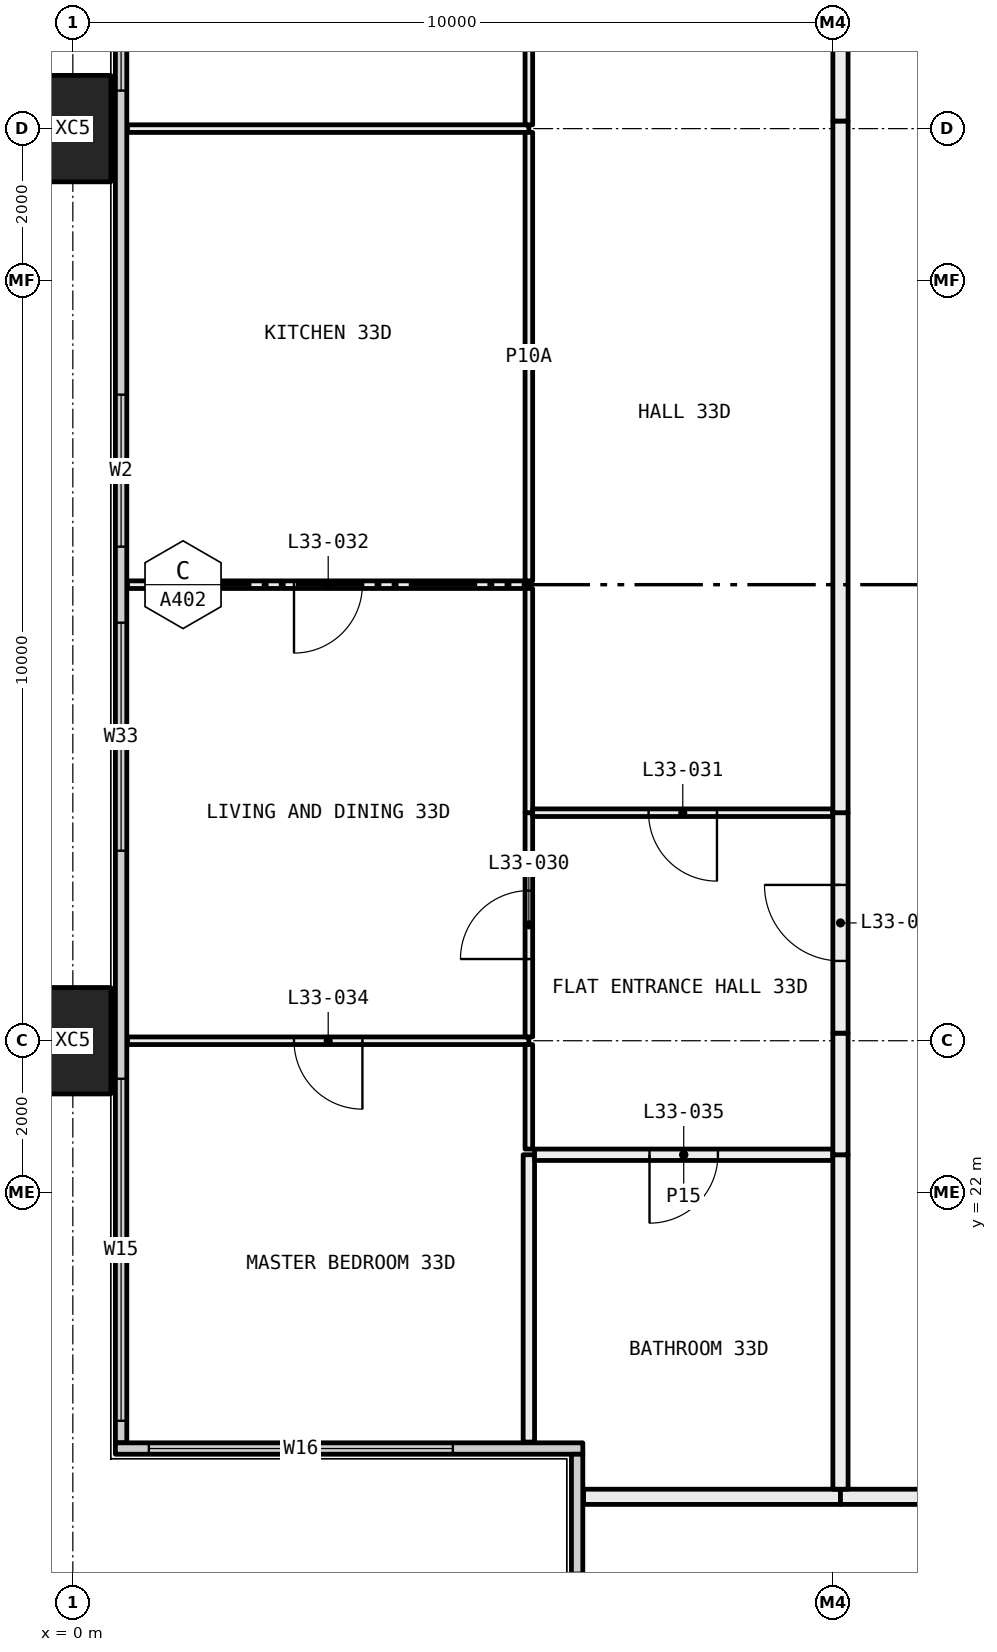
"""IFC4 building model, lengths in metres.
Left out: names, types, materials, properties, quantities, classifications, styles, units other than length and angle.
Written with IfcOpenShell. Run it as: python <this file> out.ifc"""

import sys

from ifc_helpers import new_model, si_unit, direction, frame, frame_2d, origin, origin_2d, place, context, subcontext, project, spatial, rectangle, hollow_rectangle, extrude, element, fill, save


model = new_model("IFC4")
c1 = context("Model", 3, precision=1e-05, world=origin(), true_north=direction((0.0, 1.0)))
c2 = subcontext(c1, "Body", "Model", "MODEL_VIEW")
j1 = project(units=[si_unit("LENGTHUNIT", "METRE"), si_unit("PLANEANGLEUNIT", "RADIAN")], contexts=[c1])
p1 = place(None, origin())
s1 = spatial("IfcSite", under=j1, at=p1, CompositionType="ELEMENT")
p2 = place(p1, origin())
s2 = spatial("IfcBuilding", under=s1, at=p2, CompositionType="ELEMENT")
p3 = place(p2, frame((0.0, 0.0, 127.65)))
s3 = spatial("IfcBuildingStorey", under=s2, at=p3, CompositionType="ELEMENT", Elevation=127.65)
for number, where, z_axis, x_axis in (
    (1, (0.0, 24.0, -0.4), (0.0, 0.0, 1.0), (0.0, 1.0, 0.0)),
    (2, (0.0, 36.0, -0.4), (0.0, 0.0, 1.0), (0.0, 1.0, 0.0)),
):
    element("IfcColumn", number, at=place(p3, frame(where, z_axis=z_axis, x_axis=x_axis)), inside=s3, PredefinedType="COLUMN", context=c2, shape_type="SweptSolid", body=[
        extrude(hollow_rectangle(XDim=1.4, YDim=1.0, WallThickness=0.055, at=origin_2d()), origin(), (0.0, 0.0, 1.0), 3.45),
    ])
p4 = place(p3, frame((0.635, 18.71, 0.0), z_axis=(0.0, 0.0, 1.0), x_axis=(0.0, 1.0, 0.0)))
e3 = element("IfcWall", 3, at=p4, inside=s3, PredefinedType="ELEMENTEDWALL", context=c2, shape_type="SweptSolid", body=[
    extrude(rectangle(XDim=22.58, YDim=0.15, at=frame_2d((11.29, 0.0))), origin(), (0.0, 0.0, 1.0), 3.05),
])
p5 = place(p4, frame((0.29, 0.0, 0.45)))
e4 = element("IfcOpeningElement", 4, at=p5, cuts=e3, PredefinedType="OPENING", context=c2, shape_type="SweptSolid", body=[
    extrude(rectangle(XDim=4.5, YDim=2.55, at=frame_2d((2.25, 1.275))), frame((0.0, 0.085, 0.0), z_axis=(0.0, -1.0, 0.0), x_axis=(1.0, 0.0, 0.0)), (0.0, 0.0, 1.0), 0.17),
])
p6 = place(p4, frame((7.79, 0.0, 0.45)))
e5 = element("IfcOpeningElement", 5, at=p6, cuts=e3, PredefinedType="OPENING", context=c2, shape_type="SweptSolid", body=[
    extrude(rectangle(XDim=3.0, YDim=2.55, at=frame_2d((1.5, 1.275))), frame((0.0, 0.085, 0.0), z_axis=(0.0, -1.0, 0.0), x_axis=(1.0, 0.0, 0.0)), (0.0, 0.0, 1.0), 0.17),
])
p7 = place(p4, frame((11.79, 0.0, 0.45)))
e6 = element("IfcOpeningElement", 6, at=p7, cuts=e3, PredefinedType="OPENING", context=c2, shape_type="SweptSolid", body=[
    extrude(rectangle(XDim=2.0, YDim=2.55, at=frame_2d((1.0, 1.275))), frame((0.0, 0.085, 0.0), z_axis=(0.0, -1.0, 0.0), x_axis=(1.0, 0.0, 0.0)), (0.0, 0.0, 1.0), 0.17),
])
p8 = place(p4, frame((17.79, 0.0, 0.45)))
e7 = element("IfcOpeningElement", 7, at=p8, cuts=e3, PredefinedType="OPENING", context=c2, shape_type="SweptSolid", body=[
    extrude(rectangle(XDim=4.5, YDim=2.55, at=frame_2d((2.25, 1.275))), frame((0.0, 0.085, 0.0), z_axis=(0.0, -1.0, 0.0), x_axis=(1.0, 0.0, 0.0)), (0.0, 0.0, 1.0), 0.17),
])
p9 = place(p3, frame((0.56, 18.635, 0.0), z_axis=(0.0, 0.0, 1.0), x_axis=(1.0, 0.0, 0.0)))
e8 = element("IfcWall", 8, at=p9, inside=s3, PredefinedType="ELEMENTEDWALL", context=c2, shape_type="SweptSolid", body=[
    extrude(rectangle(XDim=6.15, YDim=0.15, at=frame_2d((3.075, 0.0))), origin(), (0.0, 0.0, 1.0), 3.05),
])
p10 = place(p9, frame((0.44, 0.0, 0.45)))
e9 = element("IfcOpeningElement", 9, at=p10, cuts=e8, PredefinedType="OPENING", context=c2, shape_type="SweptSolid", body=[
    extrude(rectangle(XDim=4.0, YDim=2.55, at=frame_2d((2.0, 1.275))), frame((0.0, 0.085, 0.0), z_axis=(0.0, -1.0, 0.0), x_axis=(1.0, 0.0, 0.0)), (0.0, 0.0, 1.0), 0.17),
])
p11 = place(p3, frame((6.635, 12.71, 0.0), z_axis=(0.0, 0.0, 1.0), x_axis=(0.0, 1.0, 0.0)))
e10 = element("IfcWall", 10, at=p11, inside=s3, PredefinedType="ELEMENTEDWALL", context=c2, shape_type="SweptSolid", body=[
    extrude(rectangle(XDim=5.85, YDim=0.15, at=frame_2d((2.925, 0.0))), origin(), (0.0, 0.0, 1.0), 3.05),
])
p12 = place(p11, frame((0.29, 0.0, 0.45)))
e11 = element("IfcOpeningElement", 11, at=p12, cuts=e10, PredefinedType="OPENING", context=c2, shape_type="SweptSolid", body=[
    extrude(rectangle(XDim=4.0, YDim=2.55, at=frame_2d((2.0, 1.275))), frame((0.0, 0.085, 0.0), z_axis=(0.0, -1.0, 0.0), x_axis=(1.0, 0.0, 0.0)), (0.0, 0.0, 1.0), 0.17),
])
p13 = place(p3, frame((10.1, 18.0, 0.0), z_axis=(0.0, 0.0, 1.0), x_axis=(-1.0, 0.0, 0.0)))
e12 = element("IfcWall", 12, at=p13, inside=s3, PredefinedType="PARTITIONING", context=c2, shape_type="SweptSolid", body=[
    extrude(rectangle(XDim=3.38, YDim=0.2, at=frame_2d((1.69, 0.0))), origin(), (0.0, 0.0, 1.0), 3.05),
])
p14 = place(p3, frame((12.0, 18.0, 0.0), z_axis=(0.0, 0.0, 1.0), x_axis=(-1.0, 0.0, 0.0)))
e13 = element("IfcWall", 13, at=p14, inside=s3, PredefinedType="PARTITIONING", context=c2, shape_type="SweptSolid", body=[
    extrude(rectangle(XDim=1.9, YDim=0.2, at=frame_2d((0.95, 0.0))), origin(), (0.0, 0.0, 1.0), 3.05),
])
p15 = place(p3, frame((6.0, 24.0, 0.0), z_axis=(0.0, 0.0, 1.0), x_axis=(-1.0, 0.0, 0.0)))
e14 = element("IfcWall", 14, at=p15, inside=s3, PredefinedType="PARTITIONING", context=c2, shape_type="SweptSolid", body=[
    extrude(rectangle(XDim=5.28, YDim=0.1, at=frame_2d((2.64, 0.0))), origin(), (0.0, 0.0, 1.0), 2.45),
])
p16 = place(p15, frame((2.19, 0.0, 0.0)))
e15 = element("IfcOpeningElement", 15, at=p16, cuts=e14, PredefinedType="OPENING", context=c2, shape_type="SweptSolid", body=[
    extrude(rectangle(XDim=0.9, YDim=2.1, at=frame_2d((0.45, 1.05))), frame((0.0, 0.06, 0.0), z_axis=(0.0, -1.0, 0.0), x_axis=(1.0, 0.0, 0.0)), (0.0, 0.0, 1.0), 0.12),
])
p17 = place(p3, frame((6.0, 18.72, 0.0), z_axis=(0.0, 0.0, 1.0), x_axis=(0.0, 1.0, 0.0)))
e16 = element("IfcWall", 16, at=p17, inside=s3, PredefinedType="PARTITIONING", context=c2, shape_type="SweptSolid", body=[
    extrude(rectangle(XDim=3.78, YDim=0.15, at=frame_2d((1.89, 0.0))), origin(), (0.0, 0.0, 1.0), 3.05),
])
p18 = place(p3, frame((6.0, 22.575, 0.0), z_axis=(0.0, 0.0, 1.0), x_axis=(0.0, 1.0, 0.0)))
e17 = element("IfcWall", 17, at=p18, inside=s3, PredefinedType="PARTITIONING", context=c2, shape_type="SweptSolid", body=[
    extrude(rectangle(XDim=1.375, YDim=0.1, at=frame_2d((0.688, 0.0))), origin(), (0.0, 0.0, 1.0), 2.45),
])
p19 = place(p3, frame((6.0, 30.0, 0.0), z_axis=(0.0, 0.0, 1.0), x_axis=(-1.0, 0.0, 0.0)))
e18 = element("IfcWall", 18, at=p19, inside=s3, PredefinedType="PARTITIONING", context=c2, shape_type="SweptSolid", body=[
    extrude(rectangle(XDim=5.28, YDim=0.1, at=frame_2d((2.64, 0.0))), origin(), (0.0, 0.0, 1.0), 3.05),
])
p20 = place(p19, frame((2.19, 0.0, 0.0)))
e19 = element("IfcOpeningElement", 19, at=p20, cuts=e18, PredefinedType="OPENING", context=c2, shape_type="SweptSolid", body=[
    extrude(rectangle(XDim=0.9, YDim=2.1, at=frame_2d((0.45, 1.05))), frame((0.0, 0.06, 0.0), z_axis=(0.0, -1.0, 0.0), x_axis=(1.0, 0.0, 0.0)), (0.0, 0.0, 1.0), 0.12),
])
p21 = place(p3, frame((6.0, 24.05, 0.0), z_axis=(0.0, 0.0, 1.0), x_axis=(0.0, 1.0, 0.0)))
e20 = element("IfcWall", 20, at=p21, inside=s3, PredefinedType="PARTITIONING", context=c2, shape_type="SweptSolid", body=[
    extrude(rectangle(XDim=2.95, YDim=0.1, at=frame_2d((1.475, 0.0))), origin(), (0.0, 0.0, 1.0), 2.45),
])
p22 = place(p21, frame((1.025, 0.0, 0.0)))
e21 = element("IfcOpeningElement", 21, at=p22, cuts=e20, PredefinedType="OPENING", context=c2, shape_type="SweptSolid", body=[
    extrude(rectangle(XDim=0.9, YDim=2.1, at=frame_2d((0.45, 1.05))), frame((0.0, 0.06, 0.0), z_axis=(0.0, -1.0, 0.0), x_axis=(1.0, 0.0, 0.0)), (0.0, 0.0, 1.0), 0.12),
])
p23 = place(p3, frame((6.0, 27.0, 0.0), z_axis=(0.0, 0.0, 1.0), x_axis=(0.0, 1.0, 0.0)))
e22 = element("IfcWall", 22, at=p23, inside=s3, PredefinedType="PARTITIONING", context=c2, shape_type="SweptSolid", body=[
    extrude(rectangle(XDim=2.95, YDim=0.1, at=frame_2d((1.475, 0.0))), origin(), (0.0, 0.0, 1.0), 3.05),
])
p24 = place(p3, frame((6.0, 36.0, 0.0), z_axis=(0.0, 0.0, 1.0), x_axis=(-1.0, 0.0, 0.0)))
e23 = element("IfcWall", 23, at=p24, inside=s3, PredefinedType="PARTITIONING", context=c2, shape_type="SweptSolid", body=[
    extrude(rectangle(XDim=5.28, YDim=0.1, at=frame_2d((2.64, 0.0))), origin(), (0.0, 0.0, 1.0), 2.45),
])
p25 = place(p3, frame((6.0, 30.05, 0.0), z_axis=(0.0, 0.0, 1.0), x_axis=(0.0, 1.0, 0.0)))
e24 = element("IfcWall", 24, at=p25, inside=s3, PredefinedType="PARTITIONING", context=c2, shape_type="SweptSolid", body=[
    extrude(rectangle(XDim=5.9, YDim=0.1, at=frame_2d((2.95, 0.0))), origin(), (0.0, 0.0, 1.0), 2.45),
])
p26 = place(p3, frame((6.0, 36.05, 0.0), z_axis=(0.0, 0.0, 1.0), x_axis=(0.0, 1.0, 0.0)))
e25 = element("IfcWall", 25, at=p26, inside=s3, PredefinedType="PARTITIONING", context=c2, shape_type="SweptSolid", body=[
    extrude(rectangle(XDim=2.875, YDim=0.1, at=frame_2d((1.438, 0.0))), origin(), (0.0, 0.0, 1.0), 2.45),
])
p27 = place(p26, frame((0.988, 0.0, 0.0)))
e26 = element("IfcOpeningElement", 26, at=p27, cuts=e25, PredefinedType="OPENING", context=c2, shape_type="SweptSolid", body=[
    extrude(rectangle(XDim=0.9, YDim=2.1, at=frame_2d((0.45, 1.05))), frame((0.0, 0.06, 0.0), z_axis=(0.0, -1.0, 0.0), x_axis=(1.0, 0.0, 0.0)), (0.0, 0.0, 1.0), 0.12),
])
p28 = place(p3, frame((10.0, 22.5, 0.0), z_axis=(0.0, 0.0, 1.0), x_axis=(-1.0, 0.0, 0.0)))
e27 = element("IfcWall", 27, at=p28, inside=s3, PredefinedType="PARTITIONING", context=c2, shape_type="SweptSolid", body=[
    extrude(rectangle(XDim=3.925, YDim=0.15, at=frame_2d((1.962, 0.0))), origin(), (0.0, 0.0, 1.0), 3.05),
])
p29 = place(p28, frame((1.512, 0.0, 0.0)))
e28 = element("IfcOpeningElement", 28, at=p29, cuts=e27, PredefinedType="OPENING", context=c2, shape_type="SweptSolid", body=[
    extrude(rectangle(XDim=0.9, YDim=2.1, at=frame_2d((0.45, 1.05))), frame((0.0, 0.085, 0.0), z_axis=(0.0, -1.0, 0.0), x_axis=(1.0, 0.0, 0.0)), (0.0, 0.0, 1.0), 0.17),
])
p30 = place(p3, frame((10.1, 18.1, 0.0), z_axis=(0.0, 0.0, 1.0), x_axis=(0.0, 1.0, 0.0)))
e29 = element("IfcWall", 29, at=p30, inside=s3, PredefinedType="PARTITIONING", context=c2, shape_type="SweptSolid", body=[
    extrude(rectangle(XDim=4.4, YDim=0.2, at=frame_2d((2.2, 0.0))), origin(), (0.0, 0.0, 1.0), 3.05),
])
p31 = place(p3, frame((10.0, 27.0, 0.0), z_axis=(0.0, 0.0, 1.0), x_axis=(-1.0, 0.0, 0.0)))
e30 = element("IfcWall", 30, at=p31, inside=s3, PredefinedType="PARTITIONING", context=c2, shape_type="SweptSolid", body=[
    extrude(rectangle(XDim=3.95, YDim=0.1, at=frame_2d((1.975, 0.0))), origin(), (0.0, 0.0, 1.0), 3.05),
])
p32 = place(p31, frame((1.525, 0.0, 0.0)))
e31 = element("IfcOpeningElement", 31, at=p32, cuts=e30, PredefinedType="OPENING", context=c2, shape_type="SweptSolid", body=[
    extrude(rectangle(XDim=0.9, YDim=2.1, at=frame_2d((0.45, 1.05))), frame((0.0, 0.06, 0.0), z_axis=(0.0, -1.0, 0.0), x_axis=(1.0, 0.0, 0.0)), (0.0, 0.0, 1.0), 0.12),
])
p33 = place(p3, frame((10.1, 22.5, 0.0), z_axis=(0.0, 0.0, 1.0), x_axis=(0.0, 1.0, 0.0)))
e32 = element("IfcWall", 32, at=p33, inside=s3, PredefinedType="PARTITIONING", context=c2, shape_type="SweptSolid", body=[
    extrude(rectangle(XDim=1.6, YDim=0.2, at=frame_2d((0.8, 0.0))), origin(), (0.0, 0.0, 1.0), 2.45),
])
p34 = place(p3, frame((10.1, 24.1, 0.0), z_axis=(0.0, 0.0, 1.0), x_axis=(0.0, 1.0, 0.0)))
e33 = element("IfcWall", 33, at=p34, inside=s3, PredefinedType="PARTITIONING", context=c2, shape_type="SweptSolid", body=[
    extrude(rectangle(XDim=2.9, YDim=0.2, at=frame_2d((1.45, 0.0))), origin(), (0.0, 0.0, 1.0), 3.05),
])
p35 = place(p34, frame((0.95, 0.0, 0.0)))
e34 = element("IfcOpeningElement", 34, at=p35, cuts=e33, PredefinedType="OPENING", context=c2, shape_type="SweptSolid", body=[
    extrude(rectangle(XDim=1.0, YDim=2.1, at=frame_2d((0.5, 1.05))), frame((0.0, 0.11, 0.0), z_axis=(0.0, -1.0, 0.0), x_axis=(1.0, 0.0, 0.0)), (0.0, 0.0, 1.0), 0.22),
])
p36 = place(p3, frame((10.1, 27.0, 0.0), z_axis=(0.0, 0.0, 1.0), x_axis=(0.0, 1.0, 0.0)))
e35 = element("IfcWall", 35, at=p36, inside=s3, PredefinedType="PARTITIONING", context=c2, shape_type="SweptSolid", body=[
    extrude(rectangle(XDim=9.1, YDim=0.2, at=frame_2d((4.55, 0.0))), origin(), (0.0, 0.0, 1.0), 2.45),
])
p37 = place(p3, frame((10.1, 36.1, 0.0), z_axis=(0.0, 0.0, 1.0), x_axis=(0.0, 1.0, 0.0)))
e36 = element("IfcWall", 36, at=p37, inside=s3, PredefinedType="PARTITIONING", context=c2, shape_type="SweptSolid", body=[
    extrude(rectangle(XDim=2.9, YDim=0.2, at=frame_2d((1.45, 0.0))), origin(), (0.0, 0.0, 1.0), 3.05),
])
p38 = place(p5, origin())
e37 = element("IfcWindow", 37, at=p38, inside=s3, PartitioningType="SINGLE_PANEL", PredefinedType="WINDOW", context=c2, shape_type="SweptSolid", body=[
    extrude(rectangle(XDim=4.5, YDim=2.55, at=frame_2d((2.25, 1.275))), frame((0.0, 0.03, 0.0), z_axis=(0.0, -1.0, 0.0), x_axis=(1.0, 0.0, 0.0)), (0.0, 0.0, 1.0), 0.06),
])
fill(e4, e37)
p39 = place(p6, origin())
e38 = element("IfcWindow", 38, at=p39, inside=s3, PartitioningType="SINGLE_PANEL", PredefinedType="WINDOW", context=c2, shape_type="SweptSolid", body=[
    extrude(rectangle(XDim=3.0, YDim=2.55, at=frame_2d((1.5, 1.275))), frame((0.0, 0.03, 0.0), z_axis=(0.0, -1.0, 0.0), x_axis=(1.0, 0.0, 0.0)), (0.0, 0.0, 1.0), 0.06),
])
fill(e5, e38)
p40 = place(p7, origin())
e39 = element("IfcWindow", 39, at=p40, inside=s3, PartitioningType="SINGLE_PANEL", PredefinedType="WINDOW", context=c2, shape_type="SweptSolid", body=[
    extrude(rectangle(XDim=2.0, YDim=2.55, at=frame_2d((1.0, 1.275))), frame((0.0, 0.03, 0.0), z_axis=(0.0, -1.0, 0.0), x_axis=(1.0, 0.0, 0.0)), (0.0, 0.0, 1.0), 0.06),
])
fill(e6, e39)
p41 = place(p8, origin())
e40 = element("IfcWindow", 40, at=p41, inside=s3, PartitioningType="SINGLE_PANEL", PredefinedType="WINDOW", context=c2, shape_type="SweptSolid", body=[
    extrude(rectangle(XDim=4.5, YDim=2.55, at=frame_2d((2.25, 1.275))), frame((0.0, 0.03, 0.0), z_axis=(0.0, -1.0, 0.0), x_axis=(1.0, 0.0, 0.0)), (0.0, 0.0, 1.0), 0.06),
])
fill(e7, e40)
p42 = place(p10, origin())
e41 = element("IfcWindow", 41, at=p42, inside=s3, PartitioningType="SINGLE_PANEL", PredefinedType="WINDOW", context=c2, shape_type="SweptSolid", body=[
    extrude(rectangle(XDim=4.0, YDim=2.55, at=frame_2d((2.0, 1.275))), frame((0.0, 0.03, 0.0), z_axis=(0.0, -1.0, 0.0), x_axis=(1.0, 0.0, 0.0)), (0.0, 0.0, 1.0), 0.06),
])
fill(e9, e41)
p43 = place(p35, origin())
e42 = element("IfcDoor", 42, at=p43, inside=s3, OperationType="SINGLE_SWING_LEFT", PredefinedType="DOOR", context=c2, shape_type="SweptSolid", body=[
    extrude(rectangle(XDim=1.0, YDim=2.1, at=frame_2d((0.5, 1.05))), frame((0.0, 0.025, 0.0), z_axis=(0.0, -1.0, 0.0), x_axis=(1.0, 0.0, 0.0)), (0.0, 0.0, 1.0), 0.05),
])
fill(e34, e42)
p44 = place(p22, origin())
e43 = element("IfcDoor", 43, at=p44, inside=s3, OperationType="SINGLE_SWING_RIGHT", PredefinedType="DOOR", context=c2, shape_type="SweptSolid", body=[
    extrude(rectangle(XDim=0.9, YDim=2.1, at=frame_2d((0.45, 1.05))), frame((0.0, 0.025, 0.0), z_axis=(0.0, -1.0, 0.0), x_axis=(1.0, 0.0, 0.0)), (0.0, 0.0, 1.0), 0.05),
])
fill(e21, e43)
p45 = place(p32, origin())
e44 = element("IfcDoor", 44, at=p45, inside=s3, OperationType="SINGLE_SWING_RIGHT", PredefinedType="DOOR", context=c2, shape_type="SweptSolid", body=[
    extrude(rectangle(XDim=0.9, YDim=2.1, at=frame_2d((0.45, 1.05))), frame((0.0, 0.025, 0.0), z_axis=(0.0, -1.0, 0.0), x_axis=(1.0, 0.0, 0.0)), (0.0, 0.0, 1.0), 0.05),
])
fill(e31, e44)
p46 = place(p20, origin())
e45 = element("IfcDoor", 45, at=p46, inside=s3, OperationType="SINGLE_SWING_LEFT", PredefinedType="DOOR", context=c2, shape_type="SweptSolid", body=[
    extrude(rectangle(XDim=0.9, YDim=2.1, at=frame_2d((0.45, 1.05))), frame((0.0, 0.025, 0.0), z_axis=(0.0, -1.0, 0.0), x_axis=(1.0, 0.0, 0.0)), (0.0, 0.0, 1.0), 0.05),
])
fill(e19, e45)
p47 = place(p16, origin())
e46 = element("IfcDoor", 46, at=p47, inside=s3, OperationType="SINGLE_SWING_RIGHT", PredefinedType="DOOR", context=c2, shape_type="SweptSolid", body=[
    extrude(rectangle(XDim=0.9, YDim=2.1, at=frame_2d((0.45, 1.05))), frame((0.0, 0.025, 0.0), z_axis=(0.0, -1.0, 0.0), x_axis=(1.0, 0.0, 0.0)), (0.0, 0.0, 1.0), 0.05),
])
fill(e15, e46)
p48 = place(p29, origin())
e47 = element("IfcDoor", 47, at=p48, inside=s3, OperationType="SINGLE_SWING_LEFT", PredefinedType="DOOR", context=c2, shape_type="SweptSolid", body=[
    extrude(rectangle(XDim=0.9, YDim=2.1, at=frame_2d((0.45, 1.05))), frame((0.0, 0.025, 0.0), z_axis=(0.0, -1.0, 0.0), x_axis=(1.0, 0.0, 0.0)), (0.0, 0.0, 1.0), 0.05),
])
fill(e28, e47)
save(model, sys.argv[1])
